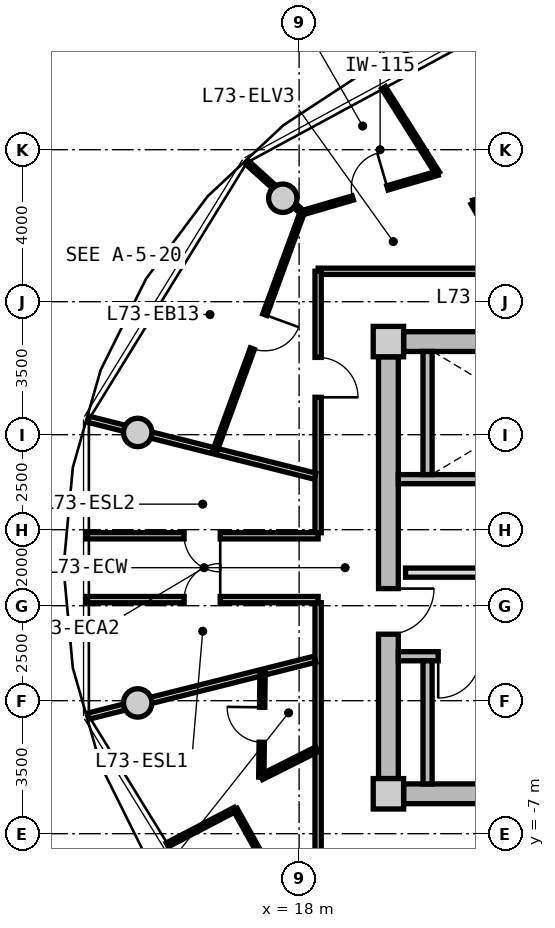
"""IFC4 building model, lengths in metres.
Left out: names, types, materials, properties, quantities, classifications, styles, units other than length and angle.
Written with IfcOpenShell. Run it as: python <this file> out.ifc"""

import sys

from ifc_helpers import new_model, si_unit, direction, frame, frame_2d, origin, origin_2d, place, context, subcontext, project, spatial, rectangle, circle, extrude, source, transform, mapped, element, fill, save


model = new_model("IFC4")
c1 = context("Model", 3, precision=1e-05, world=origin(), true_north=direction((0.0, 1.0)))
c2 = subcontext(c1, "Body", "Model", "MODEL_VIEW")
j1 = project(units=[si_unit("LENGTHUNIT", "METRE"), si_unit("PLANEANGLEUNIT", "RADIAN")], contexts=[c1])
p1 = place(None, origin())
s1 = spatial("IfcSite", under=j1, at=p1, CompositionType="ELEMENT")
p2 = place(p1, origin())
s2 = spatial("IfcBuilding", under=s1, at=p2, CompositionType="ELEMENT")
p3 = place(p2, frame((0.0, 0.0, 235.25)))
s3 = spatial("IfcBuildingStorey", under=s2, at=p3, CompositionType="ELEMENT", Elevation=235.25)
m1 = source(origin(), c2, "Body", "SweptSolid", [
    extrude(rectangle(XDim=0.8, YDim=0.8, at=origin_2d()), origin(), (0.0, 0.0, 1.0), 3.05),
])
for number, where, z_axis, x_axis in (
    (1, (20.35, -5.95, 0.0), (0.0, 0.0, 1.0), (1.0, 0.0, 0.0)),
    (2, (20.35, 5.95, 0.0), (0.0, 0.0, 1.0), (1.0, 0.0, 0.0)),
):
    element("IfcColumn", number, at=place(p3, frame(where, z_axis=z_axis, x_axis=x_axis)), inside=s3, PredefinedType="COLUMN", context=c2, shape_type="MappedRepresentation", body=[
        mapped(m1, transform((0.0, 0.0, 0.0), x_axis=(1.0, 0.0, 0.0), y_axis=(0.0, 1.0, 0.0), z_axis=(0.0, 0.0, 1.0), scale=1.0)),
    ])
m2 = source(origin(), c2, "Body", "SweptSolid", [
    extrude(rectangle(XDim=14.5, YDim=0.52, at=frame_2d((7.25, 0.0))), origin(), (0.0, 0.0, 1.0), 2.81),
])
for number, where, z_axis, x_axis in (
    (3, (20.75, 5.95, 0.0), (0.0, 0.0, 1.0), (1.0, 0.0, 0.0)),
    (4, (35.25, -5.95, 0.0), (0.0, 0.0, 1.0), (-1.0, 0.0, 0.0)),
):
    element("IfcWall", number, at=place(p3, frame(where, z_axis=z_axis, x_axis=x_axis)), inside=s3, PredefinedType="SHEAR", context=c2, shape_type="MappedRepresentation", body=[
        mapped(m2, transform((0.0, 0.0, 0.0), x_axis=(1.0, 0.0, 0.0), y_axis=(0.0, 1.0, 0.0), z_axis=(0.0, 0.0, 1.0), scale=1.0)),
    ])
m3 = source(origin(), c2, "Body", "SweptSolid", [
    extrude(rectangle(XDim=11.1, YDim=0.52, at=frame_2d((5.55, 0.0))), origin(), (0.0, 0.0, 1.0), 2.81),
])
p4 = place(p3, frame((20.35, -5.55, 0.0), z_axis=(0.0, 0.0, 1.0), x_axis=(0.0, 1.0, 0.0)))
e5 = element("IfcWall", 5, at=p4, inside=s3, PredefinedType="SHEAR", context=c2, shape_type="MappedRepresentation", body=[
    mapped(m3, transform((0.0, 0.0, 0.0), x_axis=(1.0, 0.0, 0.0), y_axis=(0.0, 1.0, 0.0), z_axis=(0.0, 0.0, 1.0), scale=1.0)),
])
p5 = place(p4, frame((3.8, 0.0, 0.0)))
e6 = element("IfcOpeningElement", 6, at=p5, cuts=e5, PredefinedType="OPENING", context=c2, shape_type="SweptSolid", body=[
    extrude(rectangle(XDim=1.2, YDim=2.15, at=frame_2d((0.6, 1.075))), frame((0.0, 0.27, 0.0), z_axis=(0.0, -1.0, 0.0), x_axis=(1.0, 0.0, 0.0)), (0.0, 0.0, 1.0), 0.54),
])
m4 = source(origin(), c2, "Body", "SweptSolid", [
    extrude(circle(Radius=0.375, at=origin_2d()), origin(), (0.0, 0.0, 1.0), 3.05),
])
for number, where, z_axis, x_axis in (
    (7, (17.57, 9.723, 0.0), (0.0, 0.0, 1.0), (1.0, 0.0, 0.0)),
    (8, (13.753, 3.559, 0.0), (0.0, 0.0, 1.0), (1.0, 0.0, 0.0)),
    (9, (13.753, -3.559, 0.0), (0.0, 0.0, 1.0), (1.0, 0.0, 0.0)),
):
    element("IfcColumn", number, at=place(p3, frame(where, z_axis=z_axis, x_axis=x_axis)), inside=s3, PredefinedType="COLUMN", context=c2, shape_type="MappedRepresentation", body=[
        mapped(m4, transform((0.0, 0.0, 0.0), x_axis=(1.0, 0.0, 0.0), y_axis=(0.0, 1.0, 0.0), z_axis=(0.0, 0.0, 1.0), scale=1.0)),
    ])
m5 = source(origin(), c2, "Body", "SweptSolid", [
    extrude(rectangle(XDim=7.93, YDim=0.24, at=frame_2d((3.965, 0.0))), origin(), (0.0, 0.0, 1.0), 2.81),
])
p6 = place(p3, frame((20.61, 2.33, 0.0), z_axis=(0.0, 0.0, 1.0), x_axis=(1.0, 0.0, 0.0)))
e10 = element("IfcWall", 10, at=p6, inside=s3, PredefinedType="PARTITIONING", context=c2, shape_type="MappedRepresentation", body=[
    mapped(m5, transform((0.0, 0.0, 0.0), x_axis=(1.0, 0.0, 0.0), y_axis=(0.0, 1.0, 0.0), z_axis=(0.0, 0.0, 1.0), scale=1.0)),
])
m6 = source(origin(), c2, "Body", "SweptSolid", [
    extrude(rectangle(XDim=3.24, YDim=0.24, at=frame_2d((1.62, 0.0))), origin(), (0.0, 0.0, 1.0), 2.81),
])
p7 = place(p3, frame((21.38, 2.45, 0.0), z_axis=(0.0, 0.0, 1.0), x_axis=(0.0, 1.0, 0.0)))
e11 = element("IfcWall", 11, at=p7, inside=s3, PredefinedType="PARTITIONING", context=c2, shape_type="MappedRepresentation", body=[
    mapped(m6, transform((0.0, 0.0, 0.0), x_axis=(1.0, 0.0, 0.0), y_axis=(0.0, 1.0, 0.0), z_axis=(0.0, 0.0, 1.0), scale=1.0)),
])
p8 = place(p3, frame((20.61, -2.33, 0.0), z_axis=(0.0, 0.0, 1.0), x_axis=(1.0, 0.0, 0.0)))
e12 = element("IfcWall", 12, at=p8, inside=s3, PredefinedType="PARTITIONING", context=c2, shape_type="MappedRepresentation", body=[
    mapped(m5, transform((0.0, 0.0, 0.0), x_axis=(1.0, 0.0, 0.0), y_axis=(0.0, 1.0, 0.0), z_axis=(0.0, 0.0, 1.0), scale=1.0)),
])
p9 = place(p8, frame((1.05, 0.0, 0.0)))
e13 = element("IfcOpeningElement", 13, at=p9, cuts=e12, PredefinedType="OPENING", context=c2, shape_type="SweptSolid", body=[
    extrude(rectangle(XDim=1.1, YDim=2.15, at=frame_2d((0.55, 1.075))), frame((0.0, 0.13, 0.0), z_axis=(0.0, -1.0, 0.0), x_axis=(1.0, 0.0, 0.0)), (0.0, 0.0, 1.0), 0.26),
])
p10 = place(p3, frame((21.38, -5.69, 0.0), z_axis=(0.0, 0.0, 1.0), x_axis=(0.0, 1.0, 0.0)))
e14 = element("IfcWall", 14, at=p10, inside=s3, PredefinedType="PARTITIONING", context=c2, shape_type="MappedRepresentation", body=[
    mapped(m6, transform((0.0, 0.0, 0.0), x_axis=(1.0, 0.0, 0.0), y_axis=(0.0, 1.0, 0.0), z_axis=(0.0, 0.0, 1.0), scale=1.0)),
])
m7 = source(origin(), c2, "Body", "SweptSolid", [
    extrude(rectangle(XDim=7.62, YDim=0.24, at=frame_2d((3.81, 0.0))), origin(), (0.0, 0.0, 1.0), 2.795),
])
p11 = place(p3, frame((20.8, -0.13, 0.0), z_axis=(0.0, 0.0, 1.0), x_axis=(1.0, 0.0, 0.0)))
e15 = element("IfcWall", 15, at=p11, inside=s3, PredefinedType="PARTITIONING", context=c2, shape_type="MappedRepresentation", body=[
    mapped(m7, transform((0.0, 0.0, 0.0), x_axis=(1.0, 0.0, 0.0), y_axis=(0.0, 1.0, 0.0), z_axis=(0.0, 0.0, 1.0), scale=1.0)),
])
p12 = place(p11, frame((6.22, 0.0, 0.0)))
e16 = element("IfcOpeningElement", 16, at=p12, cuts=e15, PredefinedType="OPENING", context=c2, shape_type="SweptSolid", body=[
    extrude(rectangle(XDim=1.0, YDim=2.1, at=frame_2d((0.5, 1.05))), frame((0.0, 0.13, 0.0), z_axis=(0.0, -1.0, 0.0), x_axis=(1.0, 0.0, 0.0)), (0.0, 0.0, 1.0), 0.26),
])
p13 = place(p11, frame((2.4, 0.0, 0.0)))
e17 = element("IfcOpeningElement", 17, at=p13, cuts=e15, PredefinedType="OPENING", context=c2, shape_type="SweptSolid", body=[
    extrude(rectangle(XDim=1.0, YDim=2.1, at=frame_2d((0.5, 1.05))), frame((0.0, 0.13, 0.0), z_axis=(0.0, -1.0, 0.0), x_axis=(1.0, 0.0, 0.0)), (0.0, 0.0, 1.0), 0.26),
])
m8 = source(origin(), c2, "Body", "SweptSolid", [
    extrude(rectangle(XDim=8.58, YDim=0.165, at=frame_2d((4.29, 0.0))), origin(), (0.0, 0.0, 1.0), 2.795),
])
p14 = place(p3, frame((18.5, 7.8, 0.0), z_axis=(0.0, 0.0, 1.0), x_axis=(1.0, 0.0, 0.0)))
e18 = element("IfcWall", 18, at=p14, inside=s3, PredefinedType="PARTITIONING", context=c2, shape_type="MappedRepresentation", body=[
    mapped(m8, transform((0.0, 0.0, 0.0), x_axis=(1.0, 0.0, 0.0), y_axis=(0.0, 1.0, 0.0), z_axis=(0.0, 0.0, 1.0), scale=1.0)),
])
m9 = source(origin(), c2, "Body", "SweptSolid", [
    extrude(rectangle(XDim=6.88, YDim=0.165, at=frame_2d((3.44, 0.0))), origin(), (0.0, 0.0, 1.0), 2.795),
])
p15 = place(p3, frame((18.5, -7.8, 0.0), z_axis=(0.0, 0.0, 1.0), x_axis=(0.0, 1.0, 0.0)))
e19 = element("IfcWall", 19, at=p15, inside=s3, PredefinedType="PARTITIONING", context=c2, shape_type="MappedRepresentation", body=[
    mapped(m9, transform((0.0, 0.0, 0.0), x_axis=(1.0, 0.0, 0.0), y_axis=(0.0, 1.0, 0.0), z_axis=(0.0, 0.0, 1.0), scale=1.0)),
])
p16 = place(p3, frame((18.5, 0.92, 0.0), z_axis=(0.0, 0.0, 1.0), x_axis=(0.0, 1.0, 0.0)))
e20 = element("IfcWall", 20, at=p16, inside=s3, PredefinedType="PARTITIONING", context=c2, shape_type="MappedRepresentation", body=[
    mapped(m9, transform((0.0, 0.0, 0.0), x_axis=(1.0, 0.0, 0.0), y_axis=(0.0, 1.0, 0.0), z_axis=(0.0, 0.0, 1.0), scale=1.0)),
])
p17 = place(p16, frame((3.564, 0.0, 0.0)))
e21 = element("IfcOpeningElement", 21, at=p17, cuts=e20, PredefinedType="OPENING", context=c2, shape_type="SweptSolid", body=[
    extrude(rectangle(XDim=1.05, YDim=2.15, at=frame_2d((0.525, 1.075))), frame((0.0, 0.093, 0.0), z_axis=(0.0, -1.0, 0.0), x_axis=(1.0, 0.0, 0.0)), (0.0, 0.0, 1.0), 0.185),
])
m10 = source(origin(), c2, "Body", "SweptSolid", [
    extrude(rectangle(XDim=6.157, YDim=0.165, at=frame_2d((3.079, 0.0))), origin(), (0.0, 0.0, 1.0), 2.395),
])
for number, where, z_axis, x_axis in (
    (22, (18.42, 2.407, 0.0), (0.0, 0.0, 1.0), (-0.97, 0.244, 0.0)),
    (23, (18.42, -2.407, 0.0), (0.0, 0.0, 1.0), (-0.97, -0.244, 0.0)),
):
    element("IfcWall", number, at=place(p3, frame(where, z_axis=z_axis, x_axis=x_axis)), inside=s3, PredefinedType="PARTITIONING", context=c2, shape_type="MappedRepresentation", body=[
        mapped(m10, transform((0.0, 0.0, 0.0), x_axis=(1.0, 0.0, 0.0), y_axis=(0.0, 1.0, 0.0), z_axis=(0.0, 0.0, 1.0), scale=1.0)),
    ])
m11 = source(origin(), c2, "Body", "SweptSolid", [
    extrude(rectangle(XDim=6.101, YDim=0.165, at=frame_2d((3.051, 0.0))), origin(), (0.0, 0.0, 1.0), 2.795),
])
p18 = place(p3, frame((12.399, 0.84, 0.0), z_axis=(0.0, 0.0, 1.0), x_axis=(1.0, 0.0, 0.0)))
e24 = element("IfcWall", 24, at=p18, inside=s3, PredefinedType="PARTITIONING", context=c2, shape_type="MappedRepresentation", body=[
    mapped(m11, transform((0.0, 0.0, 0.0), x_axis=(1.0, 0.0, 0.0), y_axis=(0.0, 1.0, 0.0), z_axis=(0.0, 0.0, 1.0), scale=1.0)),
])
p19 = place(p18, frame((2.576, 0.0, 0.0)))
e25 = element("IfcOpeningElement", 25, at=p19, cuts=e24, PredefinedType="OPENING", context=c2, shape_type="SweptSolid", body=[
    extrude(rectangle(XDim=0.95, YDim=2.1, at=frame_2d((0.475, 1.05))), frame((0.0, 0.093, 0.0), z_axis=(0.0, -1.0, 0.0), x_axis=(1.0, 0.0, 0.0)), (0.0, 0.0, 1.0), 0.185),
])
p20 = place(p3, frame((18.5, -0.84, 0.0), z_axis=(0.0, 0.0, 1.0), x_axis=(-1.0, 0.0, 0.0)))
e26 = element("IfcWall", 26, at=p20, inside=s3, PredefinedType="PARTITIONING", context=c2, shape_type="MappedRepresentation", body=[
    mapped(m11, transform((0.0, 0.0, 0.0), x_axis=(1.0, 0.0, 0.0), y_axis=(0.0, 1.0, 0.0), z_axis=(0.0, 0.0, 1.0), scale=1.0)),
])
p21 = place(p20, frame((2.576, 0.0, 0.0)))
e27 = element("IfcOpeningElement", 27, at=p21, cuts=e26, PredefinedType="OPENING", context=c2, shape_type="SweptSolid", body=[
    extrude(rectangle(XDim=0.95, YDim=2.1, at=frame_2d((0.475, 1.05))), frame((0.0, 0.093, 0.0), z_axis=(0.0, -1.0, 0.0), x_axis=(1.0, 0.0, 0.0)), (0.0, 0.0, 1.0), 0.185),
])
m12 = source(origin(), c2, "Body", "SweptSolid", [
    extrude(rectangle(XDim=6.69, YDim=0.115, at=frame_2d((3.345, 0.0))), origin(), (0.0, 0.0, 1.0), 2.795),
])
p22 = place(p3, frame((18.083, 9.352, 0.0), z_axis=(0.0, 0.0, 1.0), x_axis=(-0.343693784919, -0.939081776102, 0.0)))
e28 = element("IfcWall", 28, at=p22, inside=s3, PredefinedType="PARTITIONING", context=c2, shape_type="MappedRepresentation", body=[
    mapped(m12, transform((0.0, 0.0, 0.0), x_axis=(1.0, 0.0, 0.0), y_axis=(0.0, 1.0, 0.0), z_axis=(0.0, 0.0, 1.0), scale=1.0)),
])
p23 = place(p22, frame((2.87, 0.0, 0.0)))
e29 = element("IfcOpeningElement", 29, at=p23, cuts=e28, PredefinedType="OPENING", context=c2, shape_type="SweptSolid", body=[
    extrude(rectangle(XDim=0.95, YDim=2.1, at=frame_2d((0.475, 1.05))), frame((0.0, 0.067, 0.0), z_axis=(0.0, -1.0, 0.0), x_axis=(1.0, 0.0, 0.0)), (0.0, 0.0, 1.0), 0.135),
])
m13 = source(origin(), c2, "Body", "SweptSolid", [
    extrude(rectangle(XDim=1.977, YDim=0.115, at=frame_2d((0.989, 0.0))), origin(), (0.0, 0.0, 1.0), 2.395),
])
p24 = place(p3, frame((18.083, 9.352, 0.0), z_axis=(0.0, 0.0, 1.0), x_axis=(-0.742064998629, 0.670327933037, 0.0)))
e30 = element("IfcWall", 30, at=p24, inside=s3, PredefinedType="PARTITIONING", context=c2, shape_type="MappedRepresentation", body=[
    mapped(m13, transform((0.0, 0.0, 0.0), x_axis=(1.0, 0.0, 0.0), y_axis=(0.0, 1.0, 0.0), z_axis=(0.0, 0.0, 1.0), scale=1.0)),
])
m14 = source(origin(), c2, "Body", "SweptSolid", [
    extrude(rectangle(XDim=2.035, YDim=0.14, at=frame_2d((1.018, 0.0))), origin(), (0.0, 0.0, 1.0), 2.795),
])
p25 = place(p3, frame((23.585, 7.83, 0.0), z_axis=(0.0, 0.0, 1.0), x_axis=(-0.491092509169, 0.871107425888, 0.0)))
e31 = element("IfcWall", 31, at=p25, inside=s3, PredefinedType="PARTITIONING", context=c2, shape_type="MappedRepresentation", body=[
    mapped(m14, transform((0.0, 0.0, 0.0), x_axis=(1.0, 0.0, 0.0), y_axis=(0.0, 1.0, 0.0), z_axis=(0.0, 0.0, 1.0), scale=1.0)),
])
m15 = source(origin(), c2, "Body", "SweptSolid", [
    extrude(rectangle(XDim=2.568, YDim=0.14, at=frame_2d((1.284, 0.0))), origin(), (0.0, 0.0, 1.0), 2.795),
])
p26 = place(p3, frame((22.585, 9.603, 0.0), z_axis=(0.0, 0.0, 1.0), x_axis=(0.964796726679, 0.262996722775, 0.0)))
e32 = element("IfcWall", 32, at=p26, inside=s3, PredefinedType="PARTITIONING", context=c2, shape_type="MappedRepresentation", body=[
    mapped(m15, transform((0.0, 0.0, 0.0), x_axis=(1.0, 0.0, 0.0), y_axis=(0.0, 1.0, 0.0), z_axis=(0.0, 0.0, 1.0), scale=1.0)),
])
p27 = place(p26, frame((0.824, 0.0, 0.0)))
e33 = element("IfcOpeningElement", 33, at=p27, cuts=e32, PredefinedType="OPENING", context=c2, shape_type="SweptSolid", body=[
    extrude(rectangle(XDim=0.92, YDim=2.1, at=frame_2d((0.46, 1.05))), frame((0.0, 0.08, 0.0), z_axis=(0.0, -1.0, 0.0), x_axis=(1.0, 0.0, 0.0)), (0.0, 0.0, 1.0), 0.16),
])
m16 = source(origin(), c2, "Body", "SweptSolid", [
    extrude(rectangle(XDim=2.662, YDim=0.115, at=frame_2d((1.331, 0.0))), origin(), (0.0, 0.0, 1.0), 2.795),
])
p28 = place(p3, frame((21.645, 10.38, 0.0), z_axis=(0.0, 0.0, 1.0), x_axis=(-0.533547747092, 0.845769946009, 0.0)))
e34 = element("IfcWall", 34, at=p28, inside=s3, PredefinedType="PARTITIONING", context=c2, shape_type="MappedRepresentation", body=[
    mapped(m16, transform((0.0, 0.0, 0.0), x_axis=(1.0, 0.0, 0.0), y_axis=(0.0, 1.0, 0.0), z_axis=(0.0, 0.0, 1.0), scale=1.0)),
])
m17 = source(origin(), c2, "Body", "SweptSolid", [
    extrude(rectangle(XDim=3.702, YDim=0.115, at=frame_2d((1.851, 0.0))), origin(), (0.0, 0.0, 1.0), 2.795),
])
p29 = place(p3, frame((21.645, 10.38, 0.0), z_axis=(0.0, 0.0, 1.0), x_axis=(-0.960044309887, -0.279848035645, 0.0)))
e35 = element("IfcWall", 35, at=p29, inside=s3, PredefinedType="PARTITIONING", context=c2, shape_type="MappedRepresentation", body=[
    mapped(m17, transform((0.0, 0.0, 0.0), x_axis=(1.0, 0.0, 0.0), y_axis=(0.0, 1.0, 0.0), z_axis=(0.0, 0.0, 1.0), scale=1.0)),
])
p30 = place(p29, frame((1.376, 0.0, 0.0)))
e36 = element("IfcOpeningElement", 36, at=p30, cuts=e35, PredefinedType="OPENING", context=c2, shape_type="SweptSolid", body=[
    extrude(rectangle(XDim=0.95, YDim=2.1, at=frame_2d((0.475, 1.05))), frame((0.0, 0.067, 0.0), z_axis=(0.0, -1.0, 0.0), x_axis=(1.0, 0.0, 0.0)), (0.0, 0.0, 1.0), 0.135),
])
m18 = source(origin(), c2, "Body", "SweptSolid", [
    extrude(rectangle(XDim=1.638, YDim=0.14, at=frame_2d((0.819, 0.0))), origin(), (0.0, 0.0, 1.0), 2.795),
])
p31 = place(p3, frame((18.47, -4.778, 0.0), z_axis=(0.0, 0.0, 1.0), x_axis=(-0.893919977945, -0.448226586707, 0.0)))
e37 = element("IfcWall", 37, at=p31, inside=s3, PredefinedType="PARTITIONING", context=c2, shape_type="MappedRepresentation", body=[
    mapped(m18, transform((0.0, 0.0, 0.0), x_axis=(1.0, 0.0, 0.0), y_axis=(0.0, 1.0, 0.0), z_axis=(0.0, 0.0, 1.0), scale=1.0)),
])
m19 = source(origin(), c2, "Body", "SweptSolid", [
    extrude(rectangle(XDim=2.759, YDim=0.14, at=frame_2d((1.379, 0.0))), origin(), (0.0, 0.0, 1.0), 2.795),
])
p32 = place(p3, frame((17.005, -5.513, 0.0), z_axis=(0.0, 0.0, 1.0), x_axis=(0.01194710728, 0.999928630767, 0.0)))
e38 = element("IfcWall", 38, at=p32, inside=s3, PredefinedType="PARTITIONING", context=c2, shape_type="MappedRepresentation", body=[
    mapped(m19, transform((0.0, 0.0, 0.0), x_axis=(1.0, 0.0, 0.0), y_axis=(0.0, 1.0, 0.0), z_axis=(0.0, 0.0, 1.0), scale=1.0)),
])
p33 = place(p32, frame((0.919, 0.0, 0.0)))
e39 = element("IfcOpeningElement", 39, at=p33, cuts=e38, PredefinedType="OPENING", context=c2, shape_type="SweptSolid", body=[
    extrude(rectangle(XDim=0.92, YDim=2.1, at=frame_2d((0.46, 1.05))), frame((0.0, 0.08, 0.0), z_axis=(0.0, -1.0, 0.0), x_axis=(1.0, 0.0, 0.0)), (0.0, 0.0, 1.0), 0.16),
])
m20 = source(origin(), c2, "Body", "SweptSolid", [
    extrude(rectangle(XDim=2.015, YDim=0.115, at=frame_2d((1.007, 0.0))), origin(), (0.0, 0.0, 1.0), 2.795),
])
p34 = place(p3, frame((16.318, -6.36, 0.0), z_axis=(0.0, 0.0, 1.0), x_axis=(-0.886437892009, -0.462847559797, 0.0)))
e40 = element("IfcWall", 40, at=p34, inside=s3, PredefinedType="PARTITIONING", context=c2, shape_type="MappedRepresentation", body=[
    mapped(m20, transform((0.0, 0.0, 0.0), x_axis=(1.0, 0.0, 0.0), y_axis=(0.0, 1.0, 0.0), z_axis=(0.0, 0.0, 1.0), scale=1.0)),
])
m21 = source(origin(), c2, "Body", "SweptSolid", [
    extrude(rectangle(XDim=3.493, YDim=0.115, at=frame_2d((1.746, 0.0))), origin(), (0.0, 0.0, 1.0), 2.795),
])
p35 = place(p3, frame((16.318, -6.36, 0.0), z_axis=(0.0, 0.0, 1.0), x_axis=(0.487896553961, -0.872901456427, 0.0)))
e41 = element("IfcWall", 41, at=p35, inside=s3, PredefinedType="PARTITIONING", context=c2, shape_type="MappedRepresentation", body=[
    mapped(m21, transform((0.0, 0.0, 0.0), x_axis=(1.0, 0.0, 0.0), y_axis=(0.0, 1.0, 0.0), z_axis=(0.0, 0.0, 1.0), scale=1.0)),
])
p36 = place(p35, frame((1.271, 0.0, 0.0)))
e42 = element("IfcOpeningElement", 42, at=p36, cuts=e41, PredefinedType="OPENING", context=c2, shape_type="SweptSolid", body=[
    extrude(rectangle(XDim=0.95, YDim=2.1, at=frame_2d((0.475, 1.05))), frame((0.0, 0.067, 0.0), z_axis=(0.0, -1.0, 0.0), x_axis=(1.0, 0.0, 0.0)), (0.0, 0.0, 1.0), 0.135),
])
m22 = source(origin(), c2, "Body", "SweptSolid", [
    extrude(rectangle(XDim=1.1, YDim=2.15, at=frame_2d((0.55, 1.075))), frame((0.0, 0.025, 0.0), z_axis=(0.0, -1.0, 0.0), x_axis=(1.0, 0.0, 0.0)), (0.0, 0.0, 1.0), 0.05),
])
p37 = place(p9, frame((1.1, 0.0, 0.0), z_axis=(0.0, 0.0, 1.0), x_axis=(-1.0, 0.0, 0.0)))
e43 = element("IfcDoor", 43, at=p37, inside=s3, OperationType="SINGLE_SWING_RIGHT", PredefinedType="DOOR", context=c2, shape_type="MappedRepresentation", body=[
    mapped(m22, transform((0.0, 0.0, 0.0), x_axis=(1.0, 0.0, 0.0), y_axis=(0.0, 1.0, 0.0), z_axis=(0.0, 0.0, 1.0), scale=1.0)),
])
fill(e13, e43)
m23 = source(origin(), c2, "Body", "SweptSolid", [
    extrude(rectangle(XDim=1.2, YDim=2.15, at=frame_2d((0.6, 1.075))), frame((0.0, 0.025, 0.0), z_axis=(0.0, -1.0, 0.0), x_axis=(1.0, 0.0, 0.0)), (0.0, 0.0, 1.0), 0.05),
])
p38 = place(p5, frame((1.2, 0.0, 0.0), z_axis=(0.0, 0.0, 1.0), x_axis=(-1.0, 0.0, 0.0)))
e44 = element("IfcDoor", 44, at=p38, inside=s3, OperationType="SINGLE_SWING_LEFT", PredefinedType="DOOR", context=c2, shape_type="MappedRepresentation", body=[
    mapped(m23, transform((0.0, 0.0, 0.0), x_axis=(1.0, 0.0, 0.0), y_axis=(0.0, 1.0, 0.0), z_axis=(0.0, 0.0, 1.0), scale=1.0)),
])
fill(e6, e44)
m24 = source(origin(), c2, "Body", "SweptSolid", [
    extrude(rectangle(XDim=0.95, YDim=2.1, at=frame_2d((0.475, 1.05))), frame((0.0, 0.025, 0.0), z_axis=(0.0, -1.0, 0.0), x_axis=(1.0, 0.0, 0.0)), (0.0, 0.0, 1.0), 0.05),
])
p39 = place(p21, frame((0.95, 0.0, 0.0), z_axis=(0.0, 0.0, 1.0), x_axis=(-1.0, 0.0, 0.0)))
e45 = element("IfcDoor", 45, at=p39, inside=s3, OperationType="SINGLE_SWING_RIGHT", PredefinedType="DOOR", context=c2, shape_type="MappedRepresentation", body=[
    mapped(m24, transform((0.0, 0.0, 0.0), x_axis=(1.0, 0.0, 0.0), y_axis=(0.0, 1.0, 0.0), z_axis=(0.0, 0.0, 1.0), scale=1.0)),
])
fill(e27, e45)
p40 = place(p19, frame((0.95, 0.0, 0.0), z_axis=(0.0, 0.0, 1.0), x_axis=(-1.0, 0.0, 0.0)))
e46 = element("IfcDoor", 46, at=p40, inside=s3, OperationType="SINGLE_SWING_LEFT", PredefinedType="DOOR", context=c2, shape_type="MappedRepresentation", body=[
    mapped(m24, transform((0.0, 0.0, 0.0), x_axis=(1.0, 0.0, 0.0), y_axis=(0.0, 1.0, 0.0), z_axis=(0.0, 0.0, 1.0), scale=1.0)),
])
fill(e25, e46)
m25 = source(origin(), c2, "Body", "SweptSolid", [
    extrude(rectangle(XDim=1.05, YDim=2.15, at=frame_2d((0.525, 1.075))), frame((0.0, 0.025, 0.0), z_axis=(0.0, -1.0, 0.0), x_axis=(1.0, 0.0, 0.0)), (0.0, 0.0, 1.0), 0.05),
])
p41 = place(p17, frame((1.05, 0.0, 0.0), z_axis=(0.0, 0.0, 1.0), x_axis=(-1.0, 0.0, 0.0)))
e47 = element("IfcDoor", 47, at=p41, inside=s3, OperationType="SINGLE_SWING_RIGHT", PredefinedType="DOOR", context=c2, shape_type="MappedRepresentation", body=[
    mapped(m25, transform((0.0, 0.0, 0.0), x_axis=(1.0, 0.0, 0.0), y_axis=(0.0, 1.0, 0.0), z_axis=(0.0, 0.0, 1.0), scale=1.0)),
])
fill(e21, e47)
p42 = place(p30, frame((0.95, 0.0, 0.0), z_axis=(0.0, 0.0, 1.0), x_axis=(-1.0, 0.0, 0.0)))
e48 = element("IfcDoor", 48, at=p42, inside=s3, OperationType="SINGLE_SWING_RIGHT", PredefinedType="DOOR", context=c2, shape_type="MappedRepresentation", body=[
    mapped(m24, transform((0.0, 0.0, 0.0), x_axis=(1.0, 0.0, 0.0), y_axis=(0.0, 1.0, 0.0), z_axis=(0.0, 0.0, 1.0), scale=1.0)),
])
fill(e36, e48)
p43 = place(p23, origin())
e49 = element("IfcDoor", 49, at=p43, inside=s3, OperationType="SINGLE_SWING_LEFT", PredefinedType="DOOR", context=c2, shape_type="MappedRepresentation", body=[
    mapped(m24, transform((0.0, 0.0, 0.0), x_axis=(1.0, 0.0, 0.0), y_axis=(0.0, 1.0, 0.0), z_axis=(0.0, 0.0, 1.0), scale=1.0)),
])
fill(e29, e49)
m26 = source(origin(), c2, "Body", "SweptSolid", [
    extrude(rectangle(XDim=0.92, YDim=2.1, at=frame_2d((0.46, 1.05))), frame((0.0, 0.025, 0.0), z_axis=(0.0, -1.0, 0.0), x_axis=(1.0, 0.0, 0.0)), (0.0, 0.0, 1.0), 0.05),
])
p44 = place(p33, origin())
e50 = element("IfcDoor", 50, at=p44, inside=s3, OperationType="SINGLE_SWING_RIGHT", PredefinedType="DOOR", context=c2, shape_type="MappedRepresentation", body=[
    mapped(m26, transform((0.0, 0.0, 0.0), x_axis=(1.0, 0.0, 0.0), y_axis=(0.0, 1.0, 0.0), z_axis=(0.0, 0.0, 1.0), scale=1.0)),
])
fill(e39, e50)
save(model, sys.argv[1])
